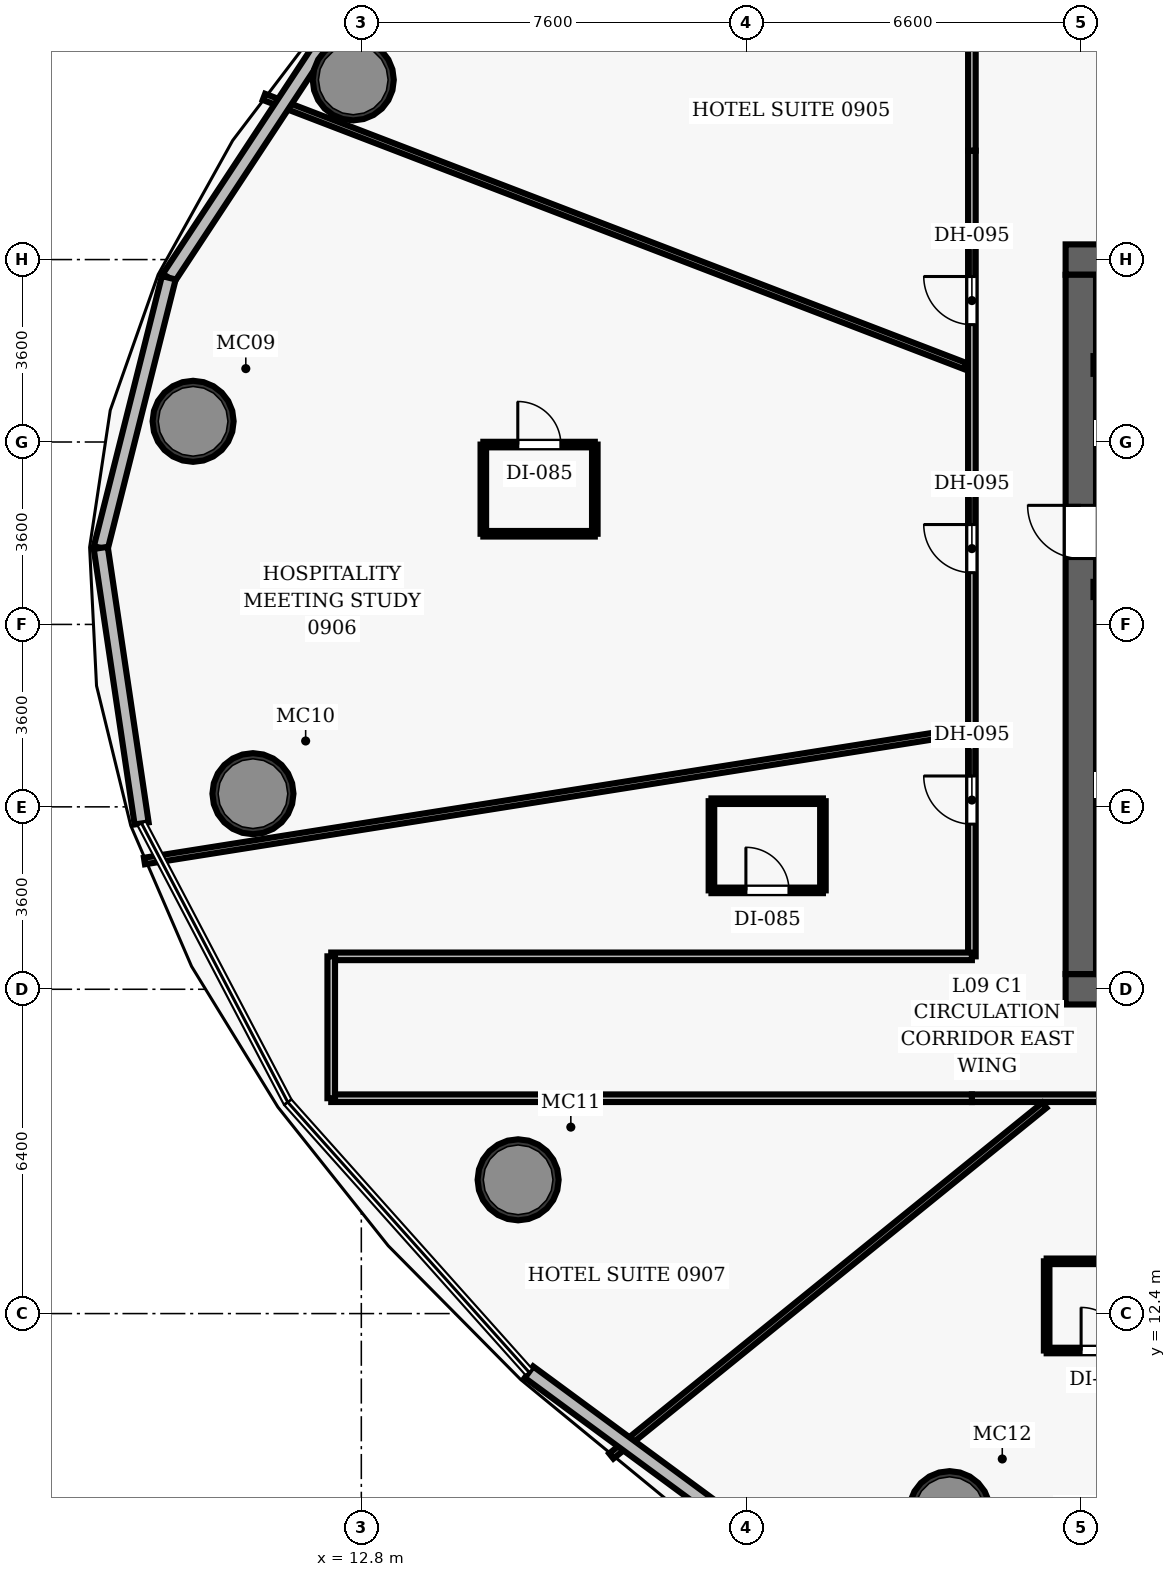
"""IFC4 building model, lengths in metres.
Left out: names, types, materials, properties, quantities, classifications, styles, units other than length and angle.
Written with IfcOpenShell. Run it as: python <this file> out.ifc"""

import sys

from ifc_helpers import new_model, si_unit, direction, frame, frame_2d, origin, origin_2d, place, context, subcontext, project, spatial, rectangle, hollow_circle, extrude, element, fill, save


model = new_model("IFC4")
c1 = context("Model", 3, precision=1e-05, world=origin(), true_north=direction((0.0, 1.0)))
c2 = subcontext(c1, "Body", "Model", "MODEL_VIEW")
j1 = project(units=[si_unit("LENGTHUNIT", "METRE"), si_unit("PLANEANGLEUNIT", "RADIAN")], contexts=[c1])
p1 = place(None, origin())
s1 = spatial("IfcSite", under=j1, at=p1, CompositionType="ELEMENT")
p2 = place(p1, origin())
s2 = spatial("IfcBuilding", under=s1, at=p2, CompositionType="ELEMENT")
p3 = place(p2, frame((0.0, 0.0, 48.4)))
s3 = spatial("IfcBuildingStorey", under=s2, at=p3, CompositionType="ELEMENT", Elevation=48.4)
p4 = place(p3, frame((26.7, 18.8, 0.0), z_axis=(0.0, 0.0, 1.0), x_axis=(1.0, 0.0, 0.0)))
e1 = element("IfcWall", 1, at=p4, inside=s3, PredefinedType="SHEAR", context=c2, shape_type="SweptSolid", body=[
    extrude(rectangle(XDim=22.6, YDim=0.6, at=frame_2d((11.3, 0.0))), origin(), (0.0, 0.0, 1.0), 3.5),
])
p5 = place(p4, frame((14.52, 0.0, 0.0)))
e2 = element("IfcOpeningElement", 2, at=p5, cuts=e1, PredefinedType="OPENING", context=c2, shape_type="SweptSolid", body=[
    extrude(rectangle(XDim=1.05, YDim=2.15, at=frame_2d((0.525, 1.075))), frame((0.0, 0.31, 0.0), z_axis=(0.0, -1.0, 0.0), x_axis=(1.0, 0.0, 0.0)), (0.0, 0.0, 1.0), 0.62),
])
p6 = place(p3, frame((26.7, 33.2, 0.0), z_axis=(0.0, 0.0, 1.0), x_axis=(1.0, 0.0, 0.0)))
e3 = element("IfcWall", 3, at=p6, inside=s3, PredefinedType="SHEAR", context=c2, shape_type="SweptSolid", body=[
    extrude(rectangle(XDim=22.6, YDim=0.6, at=frame_2d((11.3, 0.0))), origin(), (0.0, 0.0, 1.0), 3.5),
])
p7 = place(p6, frame((4.62, 0.0, 0.0)))
e4 = element("IfcOpeningElement", 4, at=p7, cuts=e3, PredefinedType="OPENING", context=c2, shape_type="SweptSolid", body=[
    extrude(rectangle(XDim=1.05, YDim=2.15, at=frame_2d((0.525, 1.075))), frame((0.0, 0.31, 0.0), z_axis=(0.0, -1.0, 0.0), x_axis=(1.0, 0.0, 0.0)), (0.0, 0.0, 1.0), 0.62),
])
p8 = place(p6, frame((14.52, 0.0, 0.0)))
e5 = element("IfcOpeningElement", 5, at=p8, cuts=e3, PredefinedType="OPENING", context=c2, shape_type="SweptSolid", body=[
    extrude(rectangle(XDim=1.05, YDim=2.15, at=frame_2d((0.525, 1.075))), frame((0.0, 0.31, 0.0), z_axis=(0.0, -1.0, 0.0), x_axis=(1.0, 0.0, 0.0)), (0.0, 0.0, 1.0), 0.62),
])
p9 = place(p3, frame((27.0, 19.1, 0.0), z_axis=(0.0, 0.0, 1.0), x_axis=(0.0, 1.0, 0.0)))
e6 = element("IfcWall", 6, at=p9, inside=s3, PredefinedType="SHEAR", context=c2, shape_type="SweptSolid", body=[
    extrude(rectangle(XDim=13.8, YDim=0.6, at=frame_2d((6.9, 0.0))), origin(), (0.0, 0.0, 1.0), 3.5),
])
p10 = place(p9, frame((8.2, 0.0, 0.0)))
e7 = element("IfcOpeningElement", 7, at=p10, cuts=e6, PredefinedType="OPENING", context=c2, shape_type="SweptSolid", body=[
    extrude(rectangle(XDim=1.05, YDim=2.15, at=frame_2d((0.525, 1.075))), frame((0.0, 0.31, 0.0), z_axis=(0.0, -1.0, 0.0), x_axis=(1.0, 0.0, 0.0)), (0.0, 0.0, 1.0), 0.62),
])
for number, where, z_axis, x_axis in (
    (8, (12.641, 36.746, 0.0), (0.0, 0.0, 1.0), (1.0, 0.0, 0.0)),
    (9, (9.48, 30.008, 0.0), (0.0, 0.0, 1.0), (1.0, 0.0, 0.0)),
    (10, (10.661, 22.66, 0.0), (0.0, 0.0, 1.0), (1.0, 0.0, 0.0)),
    (11, (15.895, 15.04, 0.0), (0.0, 0.0, 1.0), (1.0, 0.0, 0.0)),
    (12, (24.41, 8.491, 0.0), (0.0, 0.0, 1.0), (1.0, 0.0, 0.0)),
):
    element("IfcColumn", number, at=place(p3, frame(where, z_axis=z_axis, x_axis=x_axis)), inside=s3, PredefinedType="COLUMN", context=c2, shape_type="SweptSolid", body=[
        extrude(hollow_circle(Radius=0.8, WallThickness=0.06, at=origin_2d()), origin(), (0.0, 0.0, 1.0), 3.5),
    ])
p11 = place(p3, frame((27.25, 26.69, 0.0), z_axis=(0.0, 0.0, 1.0), x_axis=(1.0, 0.0, 0.0)))
e13 = element("IfcWall", 13, at=p11, inside=s3, PredefinedType="SHEAR", context=c2, shape_type="SweptSolid", body=[
    extrude(rectangle(XDim=3.67, YDim=0.3, at=frame_2d((1.835, 0.0))), origin(), (0.0, 0.0, 1.0), 3.5),
])
p12 = place(p11, frame((1.05, 0.0, 0.0)))
e14 = element("IfcOpeningElement", 14, at=p12, cuts=e13, PredefinedType="OPENING", context=c2, shape_type="SweptSolid", body=[
    extrude(rectangle(XDim=1.1, YDim=2.15, at=frame_2d((0.55, 1.075))), frame((0.0, 0.16, 0.0), z_axis=(0.0, -1.0, 0.0), x_axis=(1.0, 0.0, 0.0)), (0.0, 0.0, 1.0), 0.32),
])
p13 = place(p3, frame((27.25, 31.12, 0.0), z_axis=(0.0, 0.0, 1.0), x_axis=(1.0, 0.0, 0.0)))
e15 = element("IfcWall", 15, at=p13, inside=s3, PredefinedType="SHEAR", context=c2, shape_type="SweptSolid", body=[
    extrude(rectangle(XDim=3.67, YDim=0.35, at=frame_2d((1.835, 0.0))), origin(), (0.0, 0.0, 1.0), 2.6),
])
p14 = place(p13, frame((1.25, 0.0, 0.0)))
e16 = element("IfcOpeningElement", 16, at=p14, cuts=e15, PredefinedType="OPENING", context=c2, shape_type="SweptSolid", body=[
    extrude(rectangle(XDim=1.1, YDim=2.15, at=frame_2d((0.55, 1.075))), frame((0.0, 0.185, 0.0), z_axis=(0.0, -1.0, 0.0), x_axis=(1.0, 0.0, 0.0)), (0.0, 0.0, 1.0), 0.37),
])
p15 = place(p3, frame((24.85, 16.65, 0.0), z_axis=(0.0, 0.0, 1.0), x_axis=(1.0, 0.0, 0.0)))
e17 = element("IfcWall", 17, at=p15, inside=s3, PredefinedType="PARTITIONING", context=c2, shape_type="SweptSolid", body=[
    extrude(rectangle(XDim=23.5, YDim=0.15, at=frame_2d((11.75, 0.0))), origin(), (0.0, 0.0, 1.0), 2.6),
])
p16 = place(p15, frame((7.157, 0.0, 0.0)))
e18 = element("IfcOpeningElement", 18, at=p16, cuts=e17, PredefinedType="OPENING", context=c2, shape_type="SweptSolid", body=[
    extrude(rectangle(XDim=0.95, YDim=2.15, at=frame_2d((0.475, 1.075))), frame((0.0, 0.085, 0.0), z_axis=(0.0, -1.0, 0.0), x_axis=(1.0, 0.0, 0.0)), (0.0, 0.0, 1.0), 0.17),
])
p17 = place(p15, frame((13.039, 0.0, 0.0)))
e19 = element("IfcOpeningElement", 19, at=p17, cuts=e17, PredefinedType="OPENING", context=c2, shape_type="SweptSolid", body=[
    extrude(rectangle(XDim=0.95, YDim=2.15, at=frame_2d((0.475, 1.075))), frame((0.0, 0.085, 0.0), z_axis=(0.0, -1.0, 0.0), x_axis=(1.0, 0.0, 0.0)), (0.0, 0.0, 1.0), 0.17),
])
p18 = place(p15, frame((15.573, 0.0, 0.0)))
e20 = element("IfcOpeningElement", 20, at=p18, cuts=e17, PredefinedType="OPENING", context=c2, shape_type="SweptSolid", body=[
    extrude(rectangle(XDim=0.95, YDim=2.15, at=frame_2d((0.475, 1.075))), frame((0.0, 0.085, 0.0), z_axis=(0.0, -1.0, 0.0), x_axis=(1.0, 0.0, 0.0)), (0.0, 0.0, 1.0), 0.17),
])
p19 = place(p3, frame((24.85, 19.45, 0.0), z_axis=(0.0, 0.0, 1.0), x_axis=(0.0, 1.0, 0.0)))
e21 = element("IfcWall", 21, at=p19, inside=s3, PredefinedType="PARTITIONING", context=c2, shape_type="SweptSolid", body=[
    extrude(rectangle(XDim=15.9, YDim=0.15, at=frame_2d((7.95, 0.0))), origin(), (0.0, 0.0, 1.0), 2.6),
])
p20 = place(p19, frame((12.466, 0.0, 0.0)))
e22 = element("IfcOpeningElement", 22, at=p20, cuts=e21, PredefinedType="OPENING", context=c2, shape_type="SweptSolid", body=[
    extrude(rectangle(XDim=0.95, YDim=2.15, at=frame_2d((0.475, 1.075))), frame((0.0, 0.085, 0.0), z_axis=(0.0, -1.0, 0.0), x_axis=(1.0, 0.0, 0.0)), (0.0, 0.0, 1.0), 0.17),
])
p21 = place(p19, frame((7.571, 0.0, 0.0)))
e23 = element("IfcOpeningElement", 23, at=p21, cuts=e21, PredefinedType="OPENING", context=c2, shape_type="SweptSolid", body=[
    extrude(rectangle(XDim=0.95, YDim=2.15, at=frame_2d((0.475, 1.075))), frame((0.0, 0.085, 0.0), z_axis=(0.0, -1.0, 0.0), x_axis=(1.0, 0.0, 0.0)), (0.0, 0.0, 1.0), 0.17),
])
p22 = place(p19, frame((2.609, 0.0, 0.0)))
e24 = element("IfcOpeningElement", 24, at=p22, cuts=e21, PredefinedType="OPENING", context=c2, shape_type="SweptSolid", body=[
    extrude(rectangle(XDim=0.95, YDim=2.15, at=frame_2d((0.475, 1.075))), frame((0.0, 0.085, 0.0), z_axis=(0.0, -1.0, 0.0), x_axis=(1.0, 0.0, 0.0)), (0.0, 0.0, 1.0), 0.17),
])
for number, where, z_axis, x_axis in (
    (25, (12.206, 19.45, 0.0), (0.0, 0.0, 1.0), (1.0, 0.0, 0.0)),
    (26, (12.206, 16.65, 0.0), (0.0, 0.0, 1.0), (1.0, 0.0, 0.0)),
):
    element("IfcWall", number, at=place(p3, frame(where, z_axis=z_axis, x_axis=x_axis)), inside=s3, PredefinedType="PARTITIONING", context=c2, shape_type="SweptSolid", body=[
        extrude(rectangle(XDim=12.644, YDim=0.15, at=frame_2d((6.322, 0.0))), origin(), (0.0, 0.0, 1.0), 2.6),
    ])
p23 = place(p3, frame((12.206, 16.65, 0.0), z_axis=(0.0, 0.0, 1.0), x_axis=(0.0, 1.0, 0.0)))
e27 = element("IfcWall", 27, at=p23, inside=s3, PredefinedType="PARTITIONING", context=c2, shape_type="SweptSolid", body=[
    extrude(rectangle(XDim=2.8, YDim=0.15, at=frame_2d((1.4, 0.0))), origin(), (0.0, 0.0, 1.0), 2.6),
])
p24 = place(p3, frame((24.85, 35.35, 0.0), z_axis=(0.0, 0.0, 1.0), x_axis=(0.0, 1.0, 0.0)))
e28 = element("IfcWall", 28, at=p24, inside=s3, PredefinedType="PARTITIONING", context=c2, shape_type="SweptSolid", body=[
    extrude(rectangle(XDim=10.15, YDim=0.15, at=frame_2d((5.075, 0.0))), origin(), (0.0, 0.0, 1.0), 2.6),
])
p25 = place(p3, frame((24.71, 31.102, 0.0), z_axis=(0.0, 0.0, 1.0), x_axis=(-0.933582813914, 0.358361730049, 0.0)))
e29 = element("IfcWall", 29, at=p25, inside=s3, PredefinedType="PARTITIONING", context=c2, shape_type="SweptSolid", body=[
    extrude(rectangle(XDim=14.815, YDim=0.13, at=frame_2d((7.408, 0.0))), origin(), (0.0, 0.0, 1.0), 2.6),
])
p26 = place(p3, frame((24.71, 23.895, 0.0), z_axis=(0.0, 0.0, 1.0), x_axis=(-0.987688948482, -0.156430626946, 0.0)))
e30 = element("IfcWall", 30, at=p26, inside=s3, PredefinedType="PARTITIONING", context=c2, shape_type="SweptSolid", body=[
    extrude(rectangle(XDim=16.392, YDim=0.13, at=frame_2d((8.196, 0.0))), origin(), (0.0, 0.0, 1.0), 2.6),
])
p27 = place(p3, frame((26.281, 16.51, 0.0), z_axis=(0.0, 0.0, 1.0), x_axis=(-0.777143021666, -0.629324021372, 0.0)))
e31 = element("IfcWall", 31, at=p27, inside=s3, PredefinedType="PARTITIONING", context=c2, shape_type="SweptSolid", body=[
    extrude(rectangle(XDim=10.998, YDim=0.13, at=frame_2d((5.499, 0.0))), origin(), (0.0, 0.0, 1.0), 2.6),
])
p28 = place(p3, frame((15.208, 27.789, 0.0), z_axis=(0.0, 0.0, 1.0), x_axis=(1.0, 0.0, 0.0)))
e32 = element("IfcWall", 32, at=p28, inside=s3, PredefinedType="PARTITIONING", context=c2, shape_type="SweptSolid", body=[
    extrude(rectangle(XDim=2.2, YDim=0.11, at=frame_2d((1.1, 0.0))), origin(), (0.0, 0.0, 1.0), 2.6),
])
p29 = place(p3, frame((15.208, 29.549, 0.0), z_axis=(0.0, 0.0, 1.0), x_axis=(1.0, 0.0, 0.0)))
e33 = element("IfcWall", 33, at=p29, inside=s3, PredefinedType="PARTITIONING", context=c2, shape_type="SweptSolid", body=[
    extrude(rectangle(XDim=2.2, YDim=0.11, at=frame_2d((1.1, 0.0))), origin(), (0.0, 0.0, 1.0), 2.6),
])
p30 = place(p29, frame((0.68, 0.0, 0.0)))
e34 = element("IfcOpeningElement", 34, at=p30, cuts=e33, PredefinedType="OPENING", context=c2, shape_type="SweptSolid", body=[
    extrude(rectangle(XDim=0.85, YDim=2.1, at=frame_2d((0.425, 1.05))), frame((0.0, 0.065, 0.0), z_axis=(0.0, -1.0, 0.0), x_axis=(1.0, 0.0, 0.0)), (0.0, 0.0, 1.0), 0.13),
])
for number, where, z_axis, x_axis in (
    (35, (15.208, 27.789, 0.0), (0.0, 0.0, 1.0), (0.0, 1.0, 0.0)),
    (36, (17.408, 27.789, 0.0), (0.0, 0.0, 1.0), (0.0, 1.0, 0.0)),
):
    element("IfcWall", number, at=place(p3, frame(where, z_axis=z_axis, x_axis=x_axis)), inside=s3, PredefinedType="PARTITIONING", context=c2, shape_type="SweptSolid", body=[
        extrude(rectangle(XDim=1.76, YDim=0.11, at=frame_2d((0.88, 0.0))), origin(), (0.0, 0.0, 1.0), 2.6),
    ])
p31 = place(p3, frame((19.71, 20.752, 0.0), z_axis=(0.0, 0.0, 1.0), x_axis=(1.0, 0.0, 0.0)))
e37 = element("IfcWall", 37, at=p31, inside=s3, PredefinedType="PARTITIONING", context=c2, shape_type="SweptSolid", body=[
    extrude(rectangle(XDim=2.2, YDim=0.11, at=frame_2d((1.1, 0.0))), origin(), (0.0, 0.0, 1.0), 2.6),
])
p32 = place(p31, frame((0.68, 0.0, 0.0)))
e38 = element("IfcOpeningElement", 38, at=p32, cuts=e37, PredefinedType="OPENING", context=c2, shape_type="SweptSolid", body=[
    extrude(rectangle(XDim=0.85, YDim=2.1, at=frame_2d((0.425, 1.05))), frame((0.0, 0.065, 0.0), z_axis=(0.0, -1.0, 0.0), x_axis=(1.0, 0.0, 0.0)), (0.0, 0.0, 1.0), 0.13),
])
p33 = place(p3, frame((19.71, 22.512, 0.0), z_axis=(0.0, 0.0, 1.0), x_axis=(1.0, 0.0, 0.0)))
e39 = element("IfcWall", 39, at=p33, inside=s3, PredefinedType="PARTITIONING", context=c2, shape_type="SweptSolid", body=[
    extrude(rectangle(XDim=2.2, YDim=0.11, at=frame_2d((1.1, 0.0))), origin(), (0.0, 0.0, 1.0), 2.6),
])
for number, where, z_axis, x_axis in (
    (40, (19.71, 20.752, 0.0), (0.0, 0.0, 1.0), (0.0, 1.0, 0.0)),
    (41, (21.91, 20.752, 0.0), (0.0, 0.0, 1.0), (0.0, 1.0, 0.0)),
):
    element("IfcWall", number, at=place(p3, frame(where, z_axis=z_axis, x_axis=x_axis)), inside=s3, PredefinedType="PARTITIONING", context=c2, shape_type="SweptSolid", body=[
        extrude(rectangle(XDim=1.76, YDim=0.11, at=frame_2d((0.88, 0.0))), origin(), (0.0, 0.0, 1.0), 2.6),
    ])
p34 = place(p3, frame((26.326, 11.671, 0.0), z_axis=(0.0, 0.0, 1.0), x_axis=(1.0, 0.0, 0.0)))
e42 = element("IfcWall", 42, at=p34, inside=s3, PredefinedType="PARTITIONING", context=c2, shape_type="SweptSolid", body=[
    extrude(rectangle(XDim=2.2, YDim=0.11, at=frame_2d((1.1, 0.0))), origin(), (0.0, 0.0, 1.0), 2.6),
])
p35 = place(p34, frame((0.68, 0.0, 0.0)))
e43 = element("IfcOpeningElement", 43, at=p35, cuts=e42, PredefinedType="OPENING", context=c2, shape_type="SweptSolid", body=[
    extrude(rectangle(XDim=0.85, YDim=2.1, at=frame_2d((0.425, 1.05))), frame((0.0, 0.065, 0.0), z_axis=(0.0, -1.0, 0.0), x_axis=(1.0, 0.0, 0.0)), (0.0, 0.0, 1.0), 0.13),
])
p36 = place(p3, frame((26.326, 13.431, 0.0), z_axis=(0.0, 0.0, 1.0), x_axis=(1.0, 0.0, 0.0)))
e44 = element("IfcWall", 44, at=p36, inside=s3, PredefinedType="PARTITIONING", context=c2, shape_type="SweptSolid", body=[
    extrude(rectangle(XDim=2.2, YDim=0.11, at=frame_2d((1.1, 0.0))), origin(), (0.0, 0.0, 1.0), 2.6),
])
p37 = place(p3, frame((26.326, 11.671, 0.0), z_axis=(0.0, 0.0, 1.0), x_axis=(0.0, 1.0, 0.0)))
e45 = element("IfcWall", 45, at=p37, inside=s3, PredefinedType="PARTITIONING", context=c2, shape_type="SweptSolid", body=[
    extrude(rectangle(XDim=1.76, YDim=0.11, at=frame_2d((0.88, 0.0))), origin(), (0.0, 0.0, 1.0), 2.6),
])
p38 = place(p3, frame((9.0, 32.841, 0.0), z_axis=(0.0, 0.0, 1.0), x_axis=(0.550048067435, 0.835132997499, 0.0)))
e46 = element("IfcWall", 46, at=p38, inside=s3, PredefinedType="SOLIDWALL", context=c2, shape_type="SweptSolid", body=[
    extrude(rectangle(XDim=6.212, YDim=0.28, at=frame_2d((3.106, 0.0))), origin(), (0.0, 0.0, 1.0), 3.25),
])
p39 = place(p3, frame((7.658, 27.51, 0.0), z_axis=(0.0, 0.0, 1.0), x_axis=(0.244259426183, 0.969709921946, 0.0)))
e47 = element("IfcWall", 47, at=p39, inside=s3, PredefinedType="SOLIDWALL", context=c2, shape_type="SweptSolid", body=[
    extrude(rectangle(XDim=5.497, YDim=0.28, at=frame_2d((2.749, 0.0))), origin(), (0.0, 0.0, 1.0), 3.25),
])
p40 = place(p3, frame((8.464, 22.073, 0.0), z_axis=(0.0, 0.0, 1.0), x_axis=(-0.146728919415, 0.989176740632, 0.0)))
e48 = element("IfcWall", 48, at=p40, inside=s3, PredefinedType="SOLIDWALL", context=c2, shape_type="SweptSolid", body=[
    extrude(rectangle(XDim=5.498, YDim=0.28, at=frame_2d((2.749, 0.0))), origin(), (0.0, 0.0, 1.0), 3.25),
])
p41 = place(p3, frame((22.426, 6.594, 0.0), z_axis=(0.0, 0.0, 1.0), x_axis=(-0.805234930247, 0.592955906547, 0.0)))
e49 = element("IfcWall", 49, at=p41, inside=s3, PredefinedType="SOLIDWALL", context=c2, shape_type="SweptSolid", body=[
    extrude(rectangle(XDim=7.845, YDim=0.28, at=frame_2d((3.922, 0.0))), origin(), (0.0, 0.0, 1.0), 3.25),
])
p42 = place(p10, origin())
e50 = element("IfcDoor", 50, at=p42, inside=s3, OperationType="SINGLE_SWING_RIGHT", PredefinedType="DOOR", context=c2, shape_type="SweptSolid", body=[
    extrude(rectangle(XDim=1.05, YDim=2.15, at=frame_2d((0.525, 1.075))), frame((0.0, 0.025, 0.0), z_axis=(0.0, -1.0, 0.0), x_axis=(1.0, 0.0, 0.0)), (0.0, 0.0, 1.0), 0.05),
])
fill(e7, e50)
p43 = place(p20, origin())
e51 = element("IfcDoor", 51, at=p43, inside=s3, OperationType="SINGLE_SWING_RIGHT", PredefinedType="DOOR", context=c2, shape_type="SweptSolid", body=[
    extrude(rectangle(XDim=0.95, YDim=2.15, at=frame_2d((0.475, 1.075))), frame((0.0, 0.025, 0.0), z_axis=(0.0, -1.0, 0.0), x_axis=(1.0, 0.0, 0.0)), (0.0, 0.0, 1.0), 0.05),
])
fill(e22, e51)
p44 = place(p21, origin())
e52 = element("IfcDoor", 52, at=p44, inside=s3, OperationType="SINGLE_SWING_RIGHT", PredefinedType="DOOR", context=c2, shape_type="SweptSolid", body=[
    extrude(rectangle(XDim=0.95, YDim=2.15, at=frame_2d((0.475, 1.075))), frame((0.0, 0.025, 0.0), z_axis=(0.0, -1.0, 0.0), x_axis=(1.0, 0.0, 0.0)), (0.0, 0.0, 1.0), 0.05),
])
fill(e23, e52)
p45 = place(p30, origin())
e53 = element("IfcDoor", 53, at=p45, inside=s3, OperationType="SINGLE_SWING_LEFT", PredefinedType="DOOR", context=c2, shape_type="SweptSolid", body=[
    extrude(rectangle(XDim=0.85, YDim=2.1, at=frame_2d((0.425, 1.05))), frame((0.0, 0.025, 0.0), z_axis=(0.0, -1.0, 0.0), x_axis=(1.0, 0.0, 0.0)), (0.0, 0.0, 1.0), 0.05),
])
fill(e34, e53)
p46 = place(p22, origin())
e54 = element("IfcDoor", 54, at=p46, inside=s3, OperationType="SINGLE_SWING_RIGHT", PredefinedType="DOOR", context=c2, shape_type="SweptSolid", body=[
    extrude(rectangle(XDim=0.95, YDim=2.15, at=frame_2d((0.475, 1.075))), frame((0.0, 0.025, 0.0), z_axis=(0.0, -1.0, 0.0), x_axis=(1.0, 0.0, 0.0)), (0.0, 0.0, 1.0), 0.05),
])
fill(e24, e54)
p47 = place(p32, origin())
e55 = element("IfcDoor", 55, at=p47, inside=s3, OperationType="SINGLE_SWING_LEFT", PredefinedType="DOOR", context=c2, shape_type="SweptSolid", body=[
    extrude(rectangle(XDim=0.85, YDim=2.1, at=frame_2d((0.425, 1.05))), frame((0.0, 0.025, 0.0), z_axis=(0.0, -1.0, 0.0), x_axis=(1.0, 0.0, 0.0)), (0.0, 0.0, 1.0), 0.05),
])
fill(e38, e55)
p48 = place(p35, origin())
e56 = element("IfcDoor", 56, at=p48, inside=s3, OperationType="SINGLE_SWING_LEFT", PredefinedType="DOOR", context=c2, shape_type="SweptSolid", body=[
    extrude(rectangle(XDim=0.85, YDim=2.1, at=frame_2d((0.425, 1.05))), frame((0.0, 0.025, 0.0), z_axis=(0.0, -1.0, 0.0), x_axis=(1.0, 0.0, 0.0)), (0.0, 0.0, 1.0), 0.05),
])
fill(e43, e56)
save(model, sys.argv[1])
